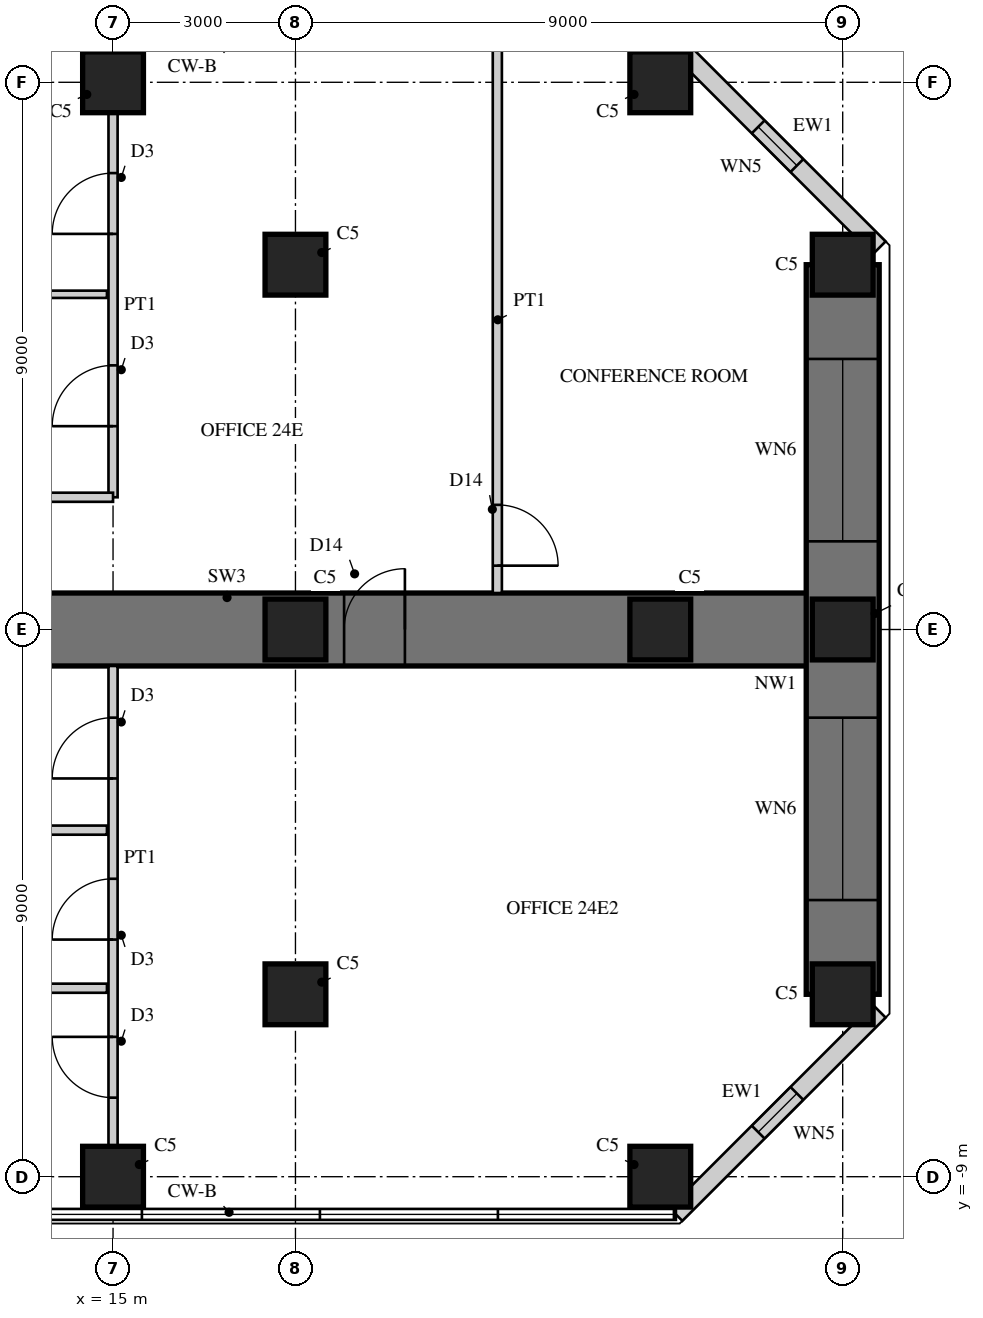
"""IFC4 building model, lengths in metres.
Left out: names, types, materials, properties, quantities, classifications, styles, units other than length and angle.
Written with IfcOpenShell. Run it as: python <this file> out.ifc"""

import sys

from ifc_helpers import new_model, si_unit, direction, frame, frame_2d, origin, origin_2d, place, context, subcontext, project, spatial, rectangle, hollow_rectangle, extrude, element, fill, save


model = new_model("IFC4")
c1 = context("Model", 3, precision=1e-05, world=origin(), true_north=direction((0.0, 1.0)))
c2 = subcontext(c1, "Body", "Model", "MODEL_VIEW")
j1 = project(units=[si_unit("LENGTHUNIT", "METRE"), si_unit("PLANEANGLEUNIT", "RADIAN")], contexts=[c1])
p1 = place(None, origin())
s1 = spatial("IfcSite", under=j1, at=p1, CompositionType="ELEMENT")
p2 = place(p1, origin())
s2 = spatial("IfcBuilding", under=s1, at=p2, CompositionType="ELEMENT")
p3 = place(p2, frame((0.0, 0.0, 100.5)))
s3 = spatial("IfcBuildingStorey", under=s2, at=p3, CompositionType="ELEMENT", Elevation=100.5)
p4 = place(p3, frame((9.0, 0.0, 0.0), z_axis=(0.0, 0.0, 1.0), x_axis=(1.0, 0.0, 0.0)))
e1 = element("IfcWall", 1, at=p4, inside=s3, PredefinedType="SHEAR", context=c2, shape_type="SweptSolid", body=[
    extrude(rectangle(XDim=18.0, YDim=1.2, at=frame_2d((9.0, 0.0))), origin(), (0.0, 0.0, 1.0), 4.0),
])
p5 = place(p4, frame((9.8, 0.0, 0.0)))
e2 = element("IfcOpeningElement", 2, at=p5, cuts=e1, PredefinedType="OPENING", context=c2, shape_type="SweptSolid", body=[
    extrude(rectangle(XDim=1.0, YDim=2.2, at=frame_2d((0.5, 1.1))), frame((0.0, 0.61, 0.0), z_axis=(0.0, -1.0, 0.0), x_axis=(1.0, 0.0, 0.0)), (0.0, 0.0, 1.0), 1.22),
])
p6 = place(p3, frame((27.0, -6.0, 0.0), z_axis=(0.0, 0.0, 1.0), x_axis=(0.0, 1.0, 0.0)))
e3 = element("IfcWall", 3, at=p6, inside=s3, PredefinedType="SHEAR", context=c2, shape_type="SweptSolid", body=[
    extrude(rectangle(XDim=12.0, YDim=1.2, at=frame_2d((6.0, 0.0))), origin(), (0.0, 0.0, 1.0), 4.0),
])
p7 = place(p6, frame((1.55, 0.0, 0.6)))
e4 = element("IfcOpeningElement", 4, at=p7, cuts=e3, PredefinedType="OPENING", context=c2, shape_type="SweptSolid", body=[
    extrude(rectangle(XDim=3.0, YDim=2.4, at=frame_2d((1.5, 1.2))), frame((0.0, 0.61, 0.0), z_axis=(0.0, -1.0, 0.0), x_axis=(1.0, 0.0, 0.0)), (0.0, 0.0, 1.0), 1.22),
])
p8 = place(p6, frame((7.45, 0.0, 0.6)))
e5 = element("IfcOpeningElement", 5, at=p8, cuts=e3, PredefinedType="OPENING", context=c2, shape_type="SweptSolid", body=[
    extrude(rectangle(XDim=3.0, YDim=2.4, at=frame_2d((1.5, 1.2))), frame((0.0, 0.61, 0.0), z_axis=(0.0, -1.0, 0.0), x_axis=(1.0, 0.0, 0.0)), (0.0, 0.0, 1.0), 1.22),
])
for number, where, z_axis, x_axis in (
    (6, (15.0, -9.0, 0.0), (0.0, 0.0, 1.0), (1.0, 0.0, 0.0)),
    (7, (24.0, -9.0, 0.0), (0.0, 0.0, 1.0), (1.0, 0.0, 0.0)),
    (8, (15.0, 9.0, 0.0), (0.0, 0.0, 1.0), (1.0, 0.0, 0.0)),
    (9, (24.0, 9.0, 0.0), (0.0, 0.0, 1.0), (1.0, 0.0, 0.0)),
    (10, (27.0, -6.0, 0.0), (0.0, 0.0, 1.0), (1.0, 0.0, 0.0)),
    (11, (27.0, 0.0, 0.0), (0.0, 0.0, 1.0), (1.0, 0.0, 0.0)),
    (12, (27.0, 6.0, 0.0), (0.0, 0.0, 1.0), (1.0, 0.0, 0.0)),
    (13, (18.0, -6.0, 0.0), (0.0, 0.0, 1.0), (1.0, 0.0, 0.0)),
    (14, (18.0, 0.0, 0.0), (0.0, 0.0, 1.0), (1.0, 0.0, 0.0)),
    (15, (18.0, 6.0, 0.0), (0.0, 0.0, 1.0), (1.0, 0.0, 0.0)),
    (16, (24.0, 0.0, 0.0), (0.0, 0.0, 1.0), (1.0, 0.0, 0.0)),
):
    element("IfcColumn", number, at=place(p3, frame(where, z_axis=z_axis, x_axis=x_axis)), inside=s3, PredefinedType="COLUMN", context=c2, shape_type="SweptSolid", body=[
        extrude(rectangle(XDim=1.0, YDim=1.0, at=origin_2d()), origin(), (0.0, 0.0, 1.0), 4.0),
    ])
p9 = place(p3, frame((24.257, -9.62, 0.0), z_axis=(0.0, 0.0, 1.0), x_axis=(0.707106781187, 0.707106781187, 0.0)))
e17 = element("IfcWall", 17, at=p9, inside=s3, PredefinedType="SOLIDWALL", context=c2, shape_type="SweptSolid", body=[
    extrude(rectangle(XDim=4.728, YDim=0.3, at=frame_2d((2.364, 0.0))), origin(), (0.0, 0.0, 1.0), 3.8),
])
p10 = place(p9, frame((1.914, 0.0, 0.3)))
e18 = element("IfcOpeningElement", 18, at=p10, cuts=e17, PredefinedType="OPENING", context=c2, shape_type="SweptSolid", body=[
    extrude(rectangle(XDim=0.9, YDim=2.4, at=frame_2d((0.45, 1.2))), frame((0.0, 0.16, 0.0), z_axis=(0.0, -1.0, 0.0), x_axis=(1.0, 0.0, 0.0)), (0.0, 0.0, 1.0), 0.32),
])
p11 = place(p3, frame((27.6, 6.277, 0.0), z_axis=(0.0, 0.0, 1.0), x_axis=(-0.707106781187, 0.707106781187, 0.0)))
e19 = element("IfcWall", 19, at=p11, inside=s3, PredefinedType="SOLIDWALL", context=c2, shape_type="SweptSolid", body=[
    extrude(rectangle(XDim=4.728, YDim=0.3, at=frame_2d((2.364, 0.0))), origin(), (0.0, 0.0, 1.0), 3.8),
])
p12 = place(p11, frame((1.914, 0.0, 0.3)))
e20 = element("IfcOpeningElement", 20, at=p12, cuts=e19, PredefinedType="OPENING", context=c2, shape_type="SweptSolid", body=[
    extrude(rectangle(XDim=0.9, YDim=2.4, at=frame_2d((0.45, 1.2))), frame((0.0, 0.16, 0.0), z_axis=(0.0, -1.0, 0.0), x_axis=(1.0, 0.0, 0.0)), (0.0, 0.0, 1.0), 0.32),
])
p13 = place(p3, frame((15.0, 2.175, 0.0), z_axis=(0.0, 0.0, 1.0), x_axis=(0.0, 1.0, 0.0)))
e21 = element("IfcWall", 21, at=p13, inside=s3, PredefinedType="PARTITIONING", context=c2, shape_type="SweptSolid", body=[
    extrude(rectangle(XDim=6.325, YDim=0.15, at=frame_2d((3.163, 0.0))), origin(), (0.0, 0.0, 1.0), 3.0),
])
p14 = place(p13, frame((1.169, 0.0, 0.0)))
e22 = element("IfcOpeningElement", 22, at=p14, cuts=e21, PredefinedType="OPENING", context=c2, shape_type="SweptSolid", body=[
    extrude(rectangle(XDim=1.0, YDim=2.1, at=frame_2d((0.5, 1.05))), frame((0.0, 0.085, 0.0), z_axis=(0.0, -1.0, 0.0), x_axis=(1.0, 0.0, 0.0)), (0.0, 0.0, 1.0), 0.17),
])
p15 = place(p13, frame((4.332, 0.0, 0.0)))
e23 = element("IfcOpeningElement", 23, at=p15, cuts=e21, PredefinedType="OPENING", context=c2, shape_type="SweptSolid", body=[
    extrude(rectangle(XDim=1.0, YDim=2.1, at=frame_2d((0.5, 1.05))), frame((0.0, 0.085, 0.0), z_axis=(0.0, -1.0, 0.0), x_axis=(1.0, 0.0, 0.0)), (0.0, 0.0, 1.0), 0.17),
])
p16 = place(p3, frame((9.65, 2.175, 0.0), z_axis=(0.0, 0.0, 1.0), x_axis=(1.0, 0.0, 0.0)))
e24 = element("IfcWall", 24, at=p16, inside=s3, PredefinedType="PARTITIONING", context=c2, shape_type="SweptSolid", body=[
    extrude(rectangle(XDim=5.35, YDim=0.15, at=frame_2d((2.675, 0.0))), origin(), (0.0, 0.0, 1.0), 3.8),
])
p17 = place(p3, frame((9.65, 5.513, 0.0), z_axis=(0.0, 0.0, 1.0), x_axis=(1.0, 0.0, 0.0)))
e25 = element("IfcWall", 25, at=p17, inside=s3, PredefinedType="PLUMBINGWALL", context=c2, shape_type="SweptSolid", body=[
    extrude(rectangle(XDim=5.25, YDim=0.12, at=frame_2d((2.625, 0.0))), origin(), (0.0, 0.0, 1.0), 3.8),
])
p18 = place(p3, frame((15.0, -8.5, 0.0), z_axis=(0.0, 0.0, 1.0), x_axis=(0.0, 1.0, 0.0)))
e26 = element("IfcWall", 26, at=p18, inside=s3, PredefinedType="PARTITIONING", context=c2, shape_type="SweptSolid", body=[
    extrude(rectangle(XDim=7.9, YDim=0.15, at=frame_2d((3.95, 0.0))), origin(), (0.0, 0.0, 1.0), 3.0),
])
p19 = place(p18, frame((0.8, 0.0, 0.0)))
e27 = element("IfcOpeningElement", 27, at=p19, cuts=e26, PredefinedType="OPENING", context=c2, shape_type="SweptSolid", body=[
    extrude(rectangle(XDim=1.0, YDim=2.1, at=frame_2d((0.5, 1.05))), frame((0.0, 0.085, 0.0), z_axis=(0.0, -1.0, 0.0), x_axis=(1.0, 0.0, 0.0)), (0.0, 0.0, 1.0), 0.17),
])
p20 = place(p18, frame((3.4, 0.0, 0.0)))
e28 = element("IfcOpeningElement", 28, at=p20, cuts=e26, PredefinedType="OPENING", context=c2, shape_type="SweptSolid", body=[
    extrude(rectangle(XDim=1.0, YDim=2.1, at=frame_2d((0.5, 1.05))), frame((0.0, 0.085, 0.0), z_axis=(0.0, -1.0, 0.0), x_axis=(1.0, 0.0, 0.0)), (0.0, 0.0, 1.0), 0.17),
])
p21 = place(p18, frame((6.05, 0.0, 0.0)))
e29 = element("IfcOpeningElement", 29, at=p21, cuts=e26, PredefinedType="OPENING", context=c2, shape_type="SweptSolid", body=[
    extrude(rectangle(XDim=1.0, YDim=2.1, at=frame_2d((0.5, 1.05))), frame((0.0, 0.085, 0.0), z_axis=(0.0, -1.0, 0.0), x_axis=(1.0, 0.0, 0.0)), (0.0, 0.0, 1.0), 0.17),
])
p22 = place(p3, frame((9.65, -3.3, 0.0), z_axis=(0.0, 0.0, 1.0), x_axis=(1.0, 0.0, 0.0)))
e30 = element("IfcWall", 30, at=p22, inside=s3, PredefinedType="PARTITIONING", context=c2, shape_type="SweptSolid", body=[
    extrude(rectangle(XDim=5.25, YDim=0.15, at=frame_2d((2.625, 0.0))), origin(), (0.0, 0.0, 1.0), 3.8),
])
p23 = place(p3, frame((9.65, -5.9, 0.0), z_axis=(0.0, 0.0, 1.0), x_axis=(1.0, 0.0, 0.0)))
e31 = element("IfcWall", 31, at=p23, inside=s3, PredefinedType="PARTITIONING", context=c2, shape_type="SweptSolid", body=[
    extrude(rectangle(XDim=5.25, YDim=0.15, at=frame_2d((2.625, 0.0))), origin(), (0.0, 0.0, 1.0), 3.1),
])
p24 = place(p3, frame((21.32, 0.6, 0.0), z_axis=(0.0, 0.0, 1.0), x_axis=(0.0, 1.0, 0.0)))
e32 = element("IfcWall", 32, at=p24, inside=s3, PredefinedType="PARTITIONING", context=c2, shape_type="SweptSolid", body=[
    extrude(rectangle(XDim=8.98, YDim=0.15, at=frame_2d((4.49, 0.0))), origin(), (0.0, 0.0, 1.0), 3.8),
])
p25 = place(p24, frame((0.45, 0.0, 0.0)))
e33 = element("IfcOpeningElement", 33, at=p25, cuts=e32, PredefinedType="OPENING", context=c2, shape_type="SweptSolid", body=[
    extrude(rectangle(XDim=1.0, YDim=2.2, at=frame_2d((0.5, 1.1))), frame((0.0, 0.085, 0.0), z_axis=(0.0, -1.0, 0.0), x_axis=(1.0, 0.0, 0.0)), (0.0, 0.0, 1.0), 0.17),
])
p26 = place(p10, origin())
e34 = element("IfcWindow", 34, at=p26, inside=s3, PartitioningType="SINGLE_PANEL", PredefinedType="WINDOW", context=c2, shape_type="SweptSolid", body=[
    extrude(hollow_rectangle(XDim=0.9, YDim=2.4, WallThickness=0.06, at=frame_2d((0.45, 1.2))), frame((0.0, 0.03, 0.0), z_axis=(0.0, -1.0, 0.0), x_axis=(1.0, 0.0, 0.0)), (0.0, 0.0, 1.0), 0.06),
    extrude(rectangle(XDim=0.779, YDim=2.279, at=frame_2d((0.45, 1.2))), frame((0.0, 0.03, 0.0), z_axis=(0.0, -1.0, 0.0), x_axis=(1.0, 0.0, 0.0)), (0.0, 0.0, 1.0), 0.06),
])
fill(e18, e34)
p27 = place(p7, origin())
e35 = element("IfcWindow", 35, at=p27, inside=s3, PartitioningType="SINGLE_PANEL", PredefinedType="WINDOW", context=c2, shape_type="SweptSolid", body=[
    extrude(hollow_rectangle(XDim=3.0, YDim=2.4, WallThickness=0.06, at=frame_2d((1.5, 1.2))), frame((0.0, 0.03, 0.0), z_axis=(0.0, -1.0, 0.0), x_axis=(1.0, 0.0, 0.0)), (0.0, 0.0, 1.0), 0.06),
    extrude(rectangle(XDim=2.879, YDim=2.279, at=frame_2d((1.5, 1.2))), frame((0.0, 0.03, 0.0), z_axis=(0.0, -1.0, 0.0), x_axis=(1.0, 0.0, 0.0)), (0.0, 0.0, 1.0), 0.06),
])
fill(e4, e35)
p28 = place(p8, origin())
e36 = element("IfcWindow", 36, at=p28, inside=s3, PartitioningType="SINGLE_PANEL", PredefinedType="WINDOW", context=c2, shape_type="SweptSolid", body=[
    extrude(hollow_rectangle(XDim=3.0, YDim=2.4, WallThickness=0.06, at=frame_2d((1.5, 1.2))), frame((0.0, 0.03, 0.0), z_axis=(0.0, -1.0, 0.0), x_axis=(1.0, 0.0, 0.0)), (0.0, 0.0, 1.0), 0.06),
    extrude(rectangle(XDim=2.879, YDim=2.279, at=frame_2d((1.5, 1.2))), frame((0.0, 0.03, 0.0), z_axis=(0.0, -1.0, 0.0), x_axis=(1.0, 0.0, 0.0)), (0.0, 0.0, 1.0), 0.06),
])
fill(e5, e36)
p29 = place(p12, origin())
e37 = element("IfcWindow", 37, at=p29, inside=s3, PartitioningType="SINGLE_PANEL", PredefinedType="WINDOW", context=c2, shape_type="SweptSolid", body=[
    extrude(hollow_rectangle(XDim=0.9, YDim=2.4, WallThickness=0.06, at=frame_2d((0.45, 1.2))), frame((0.0, 0.03, 0.0), z_axis=(0.0, -1.0, 0.0), x_axis=(1.0, 0.0, 0.0)), (0.0, 0.0, 1.0), 0.06),
    extrude(rectangle(XDim=0.779, YDim=2.279, at=frame_2d((0.45, 1.2))), frame((0.0, 0.03, 0.0), z_axis=(0.0, -1.0, 0.0), x_axis=(1.0, 0.0, 0.0)), (0.0, 0.0, 1.0), 0.06),
])
fill(e20, e37)
p30 = place(p14, origin())
e38 = element("IfcDoor", 38, at=p30, inside=s3, OperationType="SINGLE_SWING_LEFT", PredefinedType="DOOR", context=c2, shape_type="SweptSolid", body=[
    extrude(rectangle(XDim=1.0, YDim=2.1, at=frame_2d((0.5, 1.05))), frame((0.0, 0.025, 0.0), z_axis=(0.0, -1.0, 0.0), x_axis=(1.0, 0.0, 0.0)), (0.0, 0.0, 1.0), 0.05),
])
fill(e22, e38)
p31 = place(p15, origin())
e39 = element("IfcDoor", 39, at=p31, inside=s3, OperationType="SINGLE_SWING_LEFT", PredefinedType="DOOR", context=c2, shape_type="SweptSolid", body=[
    extrude(rectangle(XDim=1.0, YDim=2.1, at=frame_2d((0.5, 1.05))), frame((0.0, 0.025, 0.0), z_axis=(0.0, -1.0, 0.0), x_axis=(1.0, 0.0, 0.0)), (0.0, 0.0, 1.0), 0.05),
])
fill(e23, e39)
p32 = place(p19, origin())
e40 = element("IfcDoor", 40, at=p32, inside=s3, OperationType="SINGLE_SWING_RIGHT", PredefinedType="DOOR", context=c2, shape_type="SweptSolid", body=[
    extrude(rectangle(XDim=1.0, YDim=2.1, at=frame_2d((0.5, 1.05))), frame((0.0, 0.025, 0.0), z_axis=(0.0, -1.0, 0.0), x_axis=(1.0, 0.0, 0.0)), (0.0, 0.0, 1.0), 0.05),
])
fill(e27, e40)
p33 = place(p20, origin())
e41 = element("IfcDoor", 41, at=p33, inside=s3, OperationType="SINGLE_SWING_LEFT", PredefinedType="DOOR", context=c2, shape_type="SweptSolid", body=[
    extrude(rectangle(XDim=1.0, YDim=2.1, at=frame_2d((0.5, 1.05))), frame((0.0, 0.025, 0.0), z_axis=(0.0, -1.0, 0.0), x_axis=(1.0, 0.0, 0.0)), (0.0, 0.0, 1.0), 0.05),
])
fill(e28, e41)
p34 = place(p21, origin())
e42 = element("IfcDoor", 42, at=p34, inside=s3, OperationType="SINGLE_SWING_LEFT", PredefinedType="DOOR", context=c2, shape_type="SweptSolid", body=[
    extrude(rectangle(XDim=1.0, YDim=2.1, at=frame_2d((0.5, 1.05))), frame((0.0, 0.025, 0.0), z_axis=(0.0, -1.0, 0.0), x_axis=(1.0, 0.0, 0.0)), (0.0, 0.0, 1.0), 0.05),
])
fill(e29, e42)
p35 = place(p25, frame((1.0, 0.0, 0.0), z_axis=(0.0, 0.0, 1.0), x_axis=(-1.0, 0.0, 0.0)))
e43 = element("IfcDoor", 43, at=p35, inside=s3, OperationType="SINGLE_SWING_RIGHT", PredefinedType="DOOR", context=c2, shape_type="SweptSolid", body=[
    extrude(rectangle(XDim=1.0, YDim=2.2, at=frame_2d((0.5, 1.1))), frame((0.0, 0.025, 0.0), z_axis=(0.0, -1.0, 0.0), x_axis=(1.0, 0.0, 0.0)), (0.0, 0.0, 1.0), 0.05),
])
fill(e33, e43)
p36 = place(p5, origin())
e44 = element("IfcDoor", 44, at=p36, inside=s3, OperationType="SINGLE_SWING_RIGHT", PredefinedType="DOOR", context=c2, shape_type="SweptSolid", body=[
    extrude(rectangle(XDim=1.0, YDim=2.2, at=frame_2d((0.5, 1.1))), frame((0.0, 0.025, 0.0), z_axis=(0.0, -1.0, 0.0), x_axis=(1.0, 0.0, 0.0)), (0.0, 0.0, 1.0), 0.05),
])
fill(e2, e44)
save(model, sys.argv[1])
